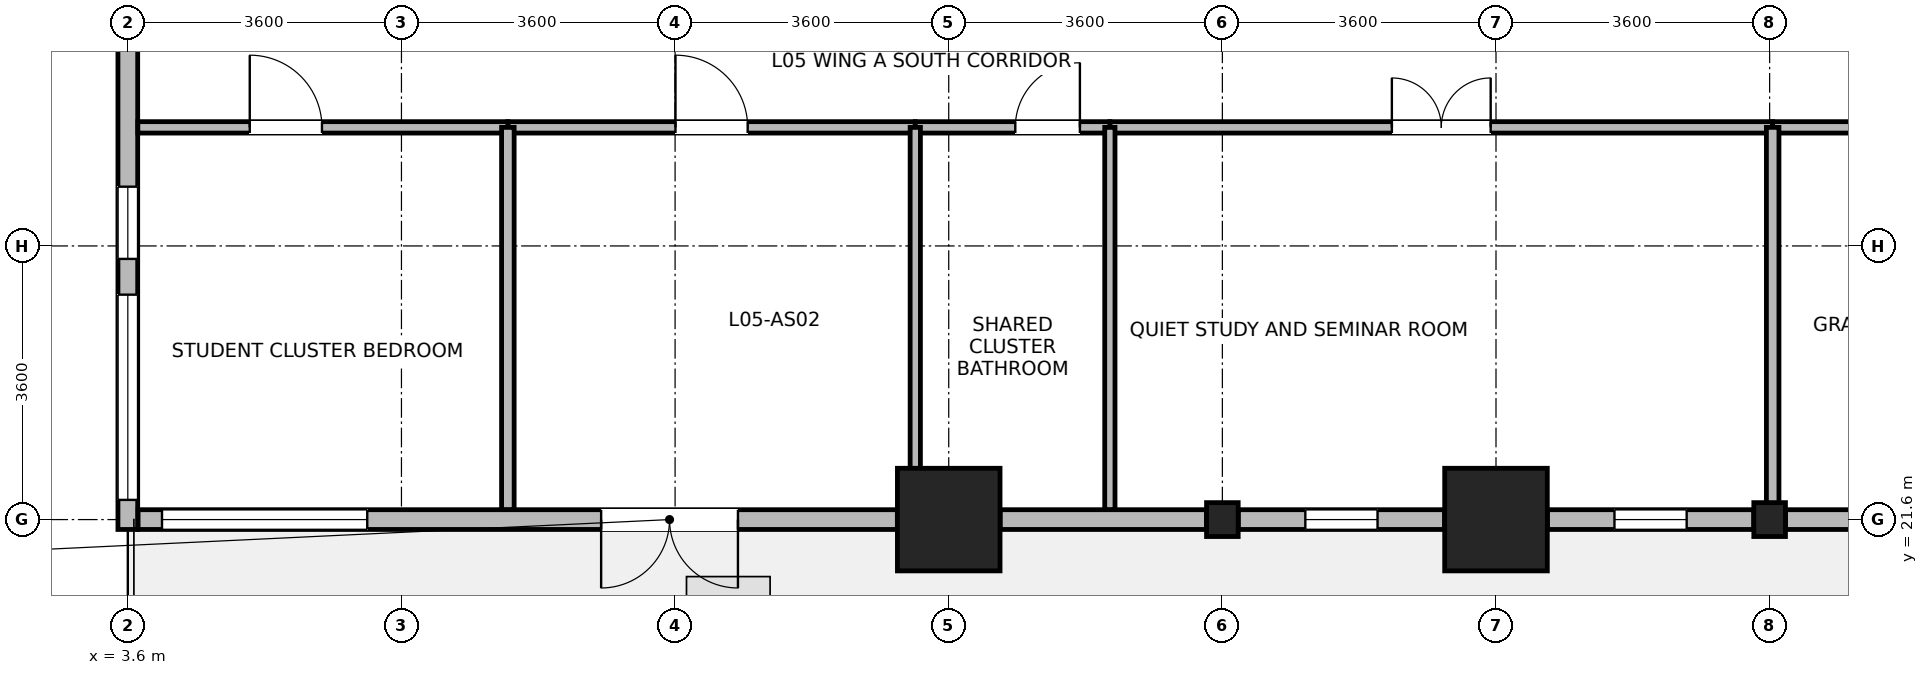
"""IFC4 building model, lengths in metres.
Left out: names, types, materials, properties, quantities, classifications, styles, units other than length and angle.
Written with IfcOpenShell. Run it as: python <this file> out.ifc"""

import sys

from ifc_helpers import new_model, si_unit, direction, frame, frame_2d, origin, origin_2d, place, context, subcontext, project, spatial, rectangle, i_section, extrude, source, transform, mapped, element, fill, save


model = new_model("IFC4")
c1 = context("Model", 3, precision=1e-05, world=origin(), true_north=direction((0.0, 1.0)))
c2 = subcontext(c1, "Body", "Model", "MODEL_VIEW")
j1 = project(units=[si_unit("LENGTHUNIT", "METRE"), si_unit("PLANEANGLEUNIT", "RADIAN")], contexts=[c1])
p1 = place(None, origin())
s1 = spatial("IfcSite", under=j1, at=p1, CompositionType="ELEMENT")
p2 = place(p1, origin())
s2 = spatial("IfcBuilding", under=s1, at=p2, CompositionType="ELEMENT")
p3 = place(p2, frame((0.0, 0.0, 25.3)))
s3 = spatial("IfcBuildingStorey", under=s2, at=p3, CompositionType="ELEMENT", Elevation=25.3)
m1 = source(origin(), c2, "Body", "SweptSolid", [
    extrude(rectangle(XDim=1.35, YDim=1.35, at=origin_2d()), origin(), (0.0, 0.0, 1.0), 3.7),
])
for number, where, z_axis, x_axis in (
    (1, (14.4, 21.6, 0.0), (0.0, 0.0, 1.0), (1.0, 0.0, 0.0)),
    (2, (21.6, 21.6, 0.0), (0.0, 0.0, 1.0), (1.0, 0.0, 0.0)),
):
    element("IfcColumn", number, at=place(p3, frame(where, z_axis=z_axis, x_axis=x_axis)), inside=s3, PredefinedType="COLUMN", context=c2, shape_type="MappedRepresentation", body=[
        mapped(m1, transform((0.0, 0.0, 0.0), x_axis=(1.0, 0.0, 0.0), y_axis=(0.0, 1.0, 0.0), z_axis=(0.0, 0.0, 1.0), scale=1.0)),
    ])
m2 = source(origin(), c2, "Body", "SweptSolid", [
    extrude(i_section(OverallWidth=0.416, OverallDepth=0.446, WebThickness=0.029, FlangeThickness=0.04, FilletRadius=0.015, at=origin_2d()), origin(), (0.0, 0.0, 1.0), 3.7),
])
for number, where, z_axis, x_axis in (
    (3, (18.0, 21.6, 0.0), (0.0, 0.0, 1.0), (1.0, 0.0, 0.0)),
    (4, (25.2, 21.6, 0.0), (0.0, 0.0, 1.0), (1.0, 0.0, 0.0)),
):
    element("IfcColumn", number, at=place(p3, frame(where, z_axis=z_axis, x_axis=x_axis)), inside=s3, PredefinedType="COLUMN", context=c2, shape_type="MappedRepresentation", body=[
        mapped(m2, transform((0.0, 0.0, 0.0), x_axis=(1.0, 0.0, 0.0), y_axis=(0.0, 1.0, 0.0), z_axis=(0.0, 0.0, 1.0), scale=1.0)),
    ])
p4 = place(p3, frame((3.6, 21.47, 0.0), z_axis=(0.0, 0.0, 1.0), x_axis=(0.0, 1.0, 0.0)))
e5 = element("IfcWall", 5, at=p4, inside=s3, PredefinedType="STANDARD", context=c2, shape_type="SweptSolid", body=[
    extrude(rectangle(XDim=6.956, YDim=0.26, at=frame_2d((3.478, 0.0))), origin(), (0.0, 0.0, 1.0), 3.43),
])
p5 = place(p4, frame((0.389, 0.0, 0.85)))
e6 = element("IfcOpeningElement", 6, at=p5, cuts=e5, PredefinedType="OPENING", context=c2, shape_type="SweptSolid", body=[
    extrude(rectangle(XDim=2.7, YDim=2.05, at=frame_2d((1.35, 1.025))), frame((0.0, 0.14, 0.0), z_axis=(0.0, -1.0, 0.0), x_axis=(1.0, 0.0, 0.0)), (0.0, 0.0, 1.0), 0.28),
])
p6 = place(p4, frame((3.56, 0.0, 0.85)))
e7 = element("IfcOpeningElement", 7, at=p6, cuts=e5, PredefinedType="OPENING", context=c2, shape_type="SweptSolid", body=[
    extrude(rectangle(XDim=0.95, YDim=1.75, at=frame_2d((0.475, 0.875))), frame((0.0, 0.14, 0.0), z_axis=(0.0, -1.0, 0.0), x_axis=(1.0, 0.0, 0.0)), (0.0, 0.0, 1.0), 0.28),
])
p7 = place(p3, frame((13.724, 21.6, 0.0), z_axis=(0.0, 0.0, 1.0), x_axis=(-1.0, 0.0, 0.0)))
e8 = element("IfcWall", 8, at=p7, inside=s3, PredefinedType="STANDARD", context=c2, shape_type="SweptSolid", body=[
    extrude(rectangle(XDim=9.989, YDim=0.26, at=frame_2d((4.995, 0.0))), origin(), (0.0, 0.0, 1.0), 3.43),
])
p8 = place(p7, frame((2.097, 0.0, 0.0)))
e9 = element("IfcOpeningElement", 9, at=p8, cuts=e8, PredefinedType="OPENING", context=c2, shape_type="SweptSolid", body=[
    extrude(rectangle(XDim=1.8, YDim=2.2, at=frame_2d((0.9, 1.1))), frame((0.0, 0.14, 0.0), z_axis=(0.0, -1.0, 0.0), x_axis=(1.0, 0.0, 0.0)), (0.0, 0.0, 1.0), 0.28),
])
p9 = place(p7, frame((6.974, 0.0, 0.85)))
e10 = element("IfcOpeningElement", 10, at=p9, cuts=e8, PredefinedType="OPENING", context=c2, shape_type="SweptSolid", body=[
    extrude(rectangle(XDim=2.7, YDim=2.05, at=frame_2d((1.35, 1.025))), frame((0.0, 0.14, 0.0), z_axis=(0.0, -1.0, 0.0), x_axis=(1.0, 0.0, 0.0)), (0.0, 0.0, 1.0), 0.28),
])
p10 = place(p3, frame((17.791, 21.6, 0.0), z_axis=(0.0, 0.0, 1.0), x_axis=(-1.0, 0.0, 0.0)))
e11 = element("IfcWall", 11, at=p10, inside=s3, PredefinedType="STANDARD", context=c2, shape_type="SweptSolid", body=[
    extrude(rectangle(XDim=2.715, YDim=0.26, at=frame_2d((1.357, 0.0))), origin(), (0.0, 0.0, 1.0), 2.93),
])
p11 = place(p3, frame((20.924, 21.6, 0.0), z_axis=(0.0, 0.0, 1.0), x_axis=(-1.0, 0.0, 0.0)))
e12 = element("IfcWall", 12, at=p11, inside=s3, PredefinedType="STANDARD", context=c2, shape_type="SweptSolid", body=[
    extrude(rectangle(XDim=2.715, YDim=0.26, at=frame_2d((1.357, 0.0))), origin(), (0.0, 0.0, 1.0), 2.93),
])
p12 = place(p11, frame((0.883, 0.0, 0.85)))
e13 = element("IfcOpeningElement", 13, at=p12, cuts=e12, PredefinedType="OPENING", context=c2, shape_type="SweptSolid", body=[
    extrude(rectangle(XDim=0.95, YDim=1.75, at=frame_2d((0.475, 0.875))), frame((0.0, 0.14, 0.0), z_axis=(0.0, -1.0, 0.0), x_axis=(1.0, 0.0, 0.0)), (0.0, 0.0, 1.0), 0.28),
])
p13 = place(p3, frame((24.991, 21.6, 0.0), z_axis=(0.0, 0.0, 1.0), x_axis=(-1.0, 0.0, 0.0)))
e14 = element("IfcWall", 14, at=p13, inside=s3, PredefinedType="STANDARD", context=c2, shape_type="SweptSolid", body=[
    extrude(rectangle(XDim=2.715, YDim=0.26, at=frame_2d((1.357, 0.0))), origin(), (0.0, 0.0, 1.0), 2.93),
])
p14 = place(p13, frame((0.883, 0.0, 0.85)))
e15 = element("IfcOpeningElement", 15, at=p14, cuts=e14, PredefinedType="OPENING", context=c2, shape_type="SweptSolid", body=[
    extrude(rectangle(XDim=0.95, YDim=1.75, at=frame_2d((0.475, 0.875))), frame((0.0, 0.14, 0.0), z_axis=(0.0, -1.0, 0.0), x_axis=(1.0, 0.0, 0.0)), (0.0, 0.0, 1.0), 0.28),
])
p15 = place(p3, frame((28.124, 21.6, 0.0), z_axis=(0.0, 0.0, 1.0), x_axis=(-1.0, 0.0, 0.0)))
e16 = element("IfcWall", 16, at=p15, inside=s3, PredefinedType="STANDARD", context=c2, shape_type="SweptSolid", body=[
    extrude(rectangle(XDim=2.715, YDim=0.26, at=frame_2d((1.357, 0.0))), origin(), (0.0, 0.0, 1.0), 2.93),
])
p16 = place(p15, frame((0.883, 0.0, 0.85)))
e17 = element("IfcOpeningElement", 17, at=p16, cuts=e16, PredefinedType="OPENING", context=c2, shape_type="SweptSolid", body=[
    extrude(rectangle(XDim=0.95, YDim=1.75, at=frame_2d((0.475, 0.875))), frame((0.0, 0.14, 0.0), z_axis=(0.0, -1.0, 0.0), x_axis=(1.0, 0.0, 0.0)), (0.0, 0.0, 1.0), 0.28),
])
p17 = place(p3, frame((16.52, 26.76, 0.0), z_axis=(0.0, 0.0, 1.0), x_axis=(1.0, 0.0, 0.0)))
e18 = element("IfcWall", 18, at=p17, inside=s3, PredefinedType="PARTITIONING", context=c2, shape_type="SweptSolid", body=[
    extrude(rectangle(XDim=8.72, YDim=0.15, at=frame_2d((4.36, 0.0))), origin(), (0.0, 0.0, 1.0), 3.43),
])
p18 = place(p17, frame((3.71, 0.0, 0.0)))
e19 = element("IfcOpeningElement", 19, at=p18, cuts=e18, PredefinedType="OPENING", context=c2, shape_type="SweptSolid", body=[
    extrude(rectangle(XDim=1.3, YDim=2.12, at=frame_2d((0.65, 1.06))), frame((0.0, 0.085, 0.0), z_axis=(0.0, -1.0, 0.0), x_axis=(1.0, 0.0, 0.0)), (0.0, 0.0, 1.0), 0.17),
])
p19 = place(p3, frame((25.24, 26.76, 0.0), z_axis=(0.0, 0.0, 1.0), x_axis=(1.0, 0.0, 0.0)))
e20 = element("IfcWall", 20, at=p19, inside=s3, PredefinedType="PARTITIONING", context=c2, shape_type="SweptSolid", body=[
    extrude(rectangle(XDim=8.12, YDim=0.15, at=frame_2d((4.06, 0.0))), origin(), (0.0, 0.0, 1.0), 3.43),
])
p20 = place(p19, frame((4.397, 0.0, 0.0)))
e21 = element("IfcOpeningElement", 21, at=p20, cuts=e20, PredefinedType="OPENING", context=c2, shape_type="SweptSolid", body=[
    extrude(rectangle(XDim=0.95, YDim=2.1, at=frame_2d((0.475, 1.05))), frame((0.0, 0.085, 0.0), z_axis=(0.0, -1.0, 0.0), x_axis=(1.0, 0.0, 0.0)), (0.0, 0.0, 1.0), 0.17),
])
p21 = place(p3, frame((8.6, 26.76, 0.0), z_axis=(0.0, 0.0, 1.0), x_axis=(1.0, 0.0, 0.0)))
e22 = element("IfcWall", 22, at=p21, inside=s3, PredefinedType="PARTITIONING", context=c2, shape_type="SweptSolid", body=[
    extrude(rectangle(XDim=5.36, YDim=0.15, at=frame_2d((2.68, 0.0))), origin(), (0.0, 0.0, 1.0), 3.43),
])
p22 = place(p21, frame((2.205, 0.0, 0.0)))
e23 = element("IfcOpeningElement", 23, at=p22, cuts=e22, PredefinedType="OPENING", context=c2, shape_type="SweptSolid", body=[
    extrude(rectangle(XDim=0.95, YDim=2.1, at=frame_2d((0.475, 1.05))), frame((0.0, 0.085, 0.0), z_axis=(0.0, -1.0, 0.0), x_axis=(1.0, 0.0, 0.0)), (0.0, 0.0, 1.0), 0.17),
])
p23 = place(p3, frame((3.732, 26.76, 0.0), z_axis=(0.0, 0.0, 1.0), x_axis=(1.0, 0.0, 0.0)))
e24 = element("IfcWall", 24, at=p23, inside=s3, PredefinedType="PARTITIONING", context=c2, shape_type="SweptSolid", body=[
    extrude(rectangle(XDim=4.868, YDim=0.15, at=frame_2d((2.434, 0.0))), origin(), (0.0, 0.0, 1.0), 3.43),
])
p24 = place(p23, frame((1.472, 0.0, 0.0)))
e25 = element("IfcOpeningElement", 25, at=p24, cuts=e24, PredefinedType="OPENING", context=c2, shape_type="SweptSolid", body=[
    extrude(rectangle(XDim=0.95, YDim=2.1, at=frame_2d((0.475, 1.05))), frame((0.0, 0.085, 0.0), z_axis=(0.0, -1.0, 0.0), x_axis=(1.0, 0.0, 0.0)), (0.0, 0.0, 1.0), 0.17),
])
p25 = place(p3, frame((13.96, 26.76, 0.0), z_axis=(0.0, 0.0, 1.0), x_axis=(1.0, 0.0, 0.0)))
e26 = element("IfcWall", 26, at=p25, inside=s3, PredefinedType="PARTITIONING", context=c2, shape_type="SweptSolid", body=[
    extrude(rectangle(XDim=2.56, YDim=0.15, at=frame_2d((1.28, 0.0))), origin(), (0.0, 0.0, 1.0), 3.43),
])
p26 = place(p25, frame((1.316, 0.0, 0.0)))
e27 = element("IfcOpeningElement", 27, at=p26, cuts=e26, PredefinedType="OPENING", context=c2, shape_type="SweptSolid", body=[
    extrude(rectangle(XDim=0.85, YDim=2.04, at=frame_2d((0.425, 1.02))), frame((0.0, 0.085, 0.0), z_axis=(0.0, -1.0, 0.0), x_axis=(1.0, 0.0, 0.0)), (0.0, 0.0, 1.0), 0.17),
])
p27 = place(p3, frame((8.6, 21.732, 0.0), z_axis=(0.0, 0.0, 1.0), x_axis=(0.0, 1.0, 0.0)))
e28 = element("IfcWall", 28, at=p27, inside=s3, PredefinedType="PARTITIONING", context=c2, shape_type="SweptSolid", body=[
    extrude(rectangle(XDim=5.028, YDim=0.165, at=frame_2d((2.514, 0.0))), origin(), (0.0, 0.0, 1.0), 3.43),
])
for number, where, z_axis, x_axis in (
    (29, (13.96, 21.732, 0.0), (0.0, 0.0, 1.0), (0.0, 1.0, 0.0)),
    (30, (16.52, 21.732, 0.0), (0.0, 0.0, 1.0), (0.0, 1.0, 0.0)),
):
    element("IfcWall", number, at=place(p3, frame(where, z_axis=z_axis, x_axis=x_axis)), inside=s3, PredefinedType="PARTITIONING", context=c2, shape_type="SweptSolid", body=[
        extrude(rectangle(XDim=5.028, YDim=0.135, at=frame_2d((2.514, 0.0))), origin(), (0.0, 0.0, 1.0), 3.43),
    ])
p28 = place(p3, frame((25.24, 21.732, 0.0), z_axis=(0.0, 0.0, 1.0), x_axis=(0.0, 1.0, 0.0)))
e31 = element("IfcWall", 31, at=p28, inside=s3, PredefinedType="PARTITIONING", context=c2, shape_type="SweptSolid", body=[
    extrude(rectangle(XDim=5.028, YDim=0.165, at=frame_2d((2.514, 0.0))), origin(), (0.0, 0.0, 1.0), 3.07),
])
p29 = place(p5, origin())
e32 = element("IfcWindow", 32, at=p29, inside=s3, PartitioningType="SINGLE_PANEL", PredefinedType="WINDOW", context=c2, shape_type="SweptSolid", body=[
    extrude(rectangle(XDim=2.7, YDim=2.05, at=frame_2d((1.35, 1.025))), frame((0.0, 0.03, 0.0), z_axis=(0.0, -1.0, 0.0), x_axis=(1.0, 0.0, 0.0)), (0.0, 0.0, 1.0), 0.06),
])
fill(e6, e32)
p30 = place(p6, origin())
e33 = element("IfcWindow", 33, at=p30, inside=s3, PartitioningType="SINGLE_PANEL", PredefinedType="WINDOW", context=c2, shape_type="SweptSolid", body=[
    extrude(rectangle(XDim=0.95, YDim=1.75, at=frame_2d((0.475, 0.875))), frame((0.0, 0.03, 0.0), z_axis=(0.0, -1.0, 0.0), x_axis=(1.0, 0.0, 0.0)), (0.0, 0.0, 1.0), 0.06),
])
fill(e7, e33)
p31 = place(p8, origin())
e34 = element("IfcDoor", 34, at=p31, inside=s3, OperationType="DOUBLE_DOOR_SINGLE_SWING", PredefinedType="DOOR", context=c2, shape_type="SweptSolid", body=[
    extrude(rectangle(XDim=1.8, YDim=2.2, at=frame_2d((0.9, 1.1))), frame((0.0, 0.025, 0.0), z_axis=(0.0, -1.0, 0.0), x_axis=(1.0, 0.0, 0.0)), (0.0, 0.0, 1.0), 0.05),
])
fill(e9, e34)
p32 = place(p9, origin())
e35 = element("IfcWindow", 35, at=p32, inside=s3, PartitioningType="SINGLE_PANEL", PredefinedType="WINDOW", context=c2, shape_type="SweptSolid", body=[
    extrude(rectangle(XDim=2.7, YDim=2.05, at=frame_2d((1.35, 1.025))), frame((0.0, 0.03, 0.0), z_axis=(0.0, -1.0, 0.0), x_axis=(1.0, 0.0, 0.0)), (0.0, 0.0, 1.0), 0.06),
])
fill(e10, e35)
p33 = place(p12, origin())
e36 = element("IfcWindow", 36, at=p33, inside=s3, PartitioningType="SINGLE_PANEL", PredefinedType="WINDOW", context=c2, shape_type="SweptSolid", body=[
    extrude(rectangle(XDim=0.95, YDim=1.75, at=frame_2d((0.475, 0.875))), frame((0.0, 0.03, 0.0), z_axis=(0.0, -1.0, 0.0), x_axis=(1.0, 0.0, 0.0)), (0.0, 0.0, 1.0), 0.06),
])
fill(e13, e36)
p34 = place(p14, origin())
e37 = element("IfcWindow", 37, at=p34, inside=s3, PartitioningType="SINGLE_PANEL", PredefinedType="WINDOW", context=c2, shape_type="SweptSolid", body=[
    extrude(rectangle(XDim=0.95, YDim=1.75, at=frame_2d((0.475, 0.875))), frame((0.0, 0.03, 0.0), z_axis=(0.0, -1.0, 0.0), x_axis=(1.0, 0.0, 0.0)), (0.0, 0.0, 1.0), 0.06),
])
fill(e15, e37)
p35 = place(p18, origin())
e38 = element("IfcDoor", 38, at=p35, inside=s3, OperationType="DOUBLE_DOOR_SINGLE_SWING", PredefinedType="DOOR", context=c2, shape_type="SweptSolid", body=[
    extrude(rectangle(XDim=1.3, YDim=2.12, at=frame_2d((0.65, 1.06))), frame((0.0, 0.025, 0.0), z_axis=(0.0, -1.0, 0.0), x_axis=(1.0, 0.0, 0.0)), (0.0, 0.0, 1.0), 0.05),
])
fill(e19, e38)
p36 = place(p22, origin())
e39 = element("IfcDoor", 39, at=p36, inside=s3, OperationType="SINGLE_SWING_LEFT", PredefinedType="DOOR", context=c2, shape_type="SweptSolid", body=[
    extrude(rectangle(XDim=0.95, YDim=2.1, at=frame_2d((0.475, 1.05))), frame((0.0, 0.025, 0.0), z_axis=(0.0, -1.0, 0.0), x_axis=(1.0, 0.0, 0.0)), (0.0, 0.0, 1.0), 0.05),
])
fill(e23, e39)
p37 = place(p24, origin())
e40 = element("IfcDoor", 40, at=p37, inside=s3, OperationType="SINGLE_SWING_LEFT", PredefinedType="DOOR", context=c2, shape_type="SweptSolid", body=[
    extrude(rectangle(XDim=0.95, YDim=2.1, at=frame_2d((0.475, 1.05))), frame((0.0, 0.025, 0.0), z_axis=(0.0, -1.0, 0.0), x_axis=(1.0, 0.0, 0.0)), (0.0, 0.0, 1.0), 0.05),
])
fill(e25, e40)
p38 = place(p26, origin())
e41 = element("IfcDoor", 41, at=p38, inside=s3, OperationType="SINGLE_SWING_RIGHT", PredefinedType="DOOR", context=c2, shape_type="SweptSolid", body=[
    extrude(rectangle(XDim=0.85, YDim=2.04, at=frame_2d((0.425, 1.02))), frame((0.0, 0.025, 0.0), z_axis=(0.0, -1.0, 0.0), x_axis=(1.0, 0.0, 0.0)), (0.0, 0.0, 1.0), 0.05),
])
fill(e27, e41)
save(model, sys.argv[1])
